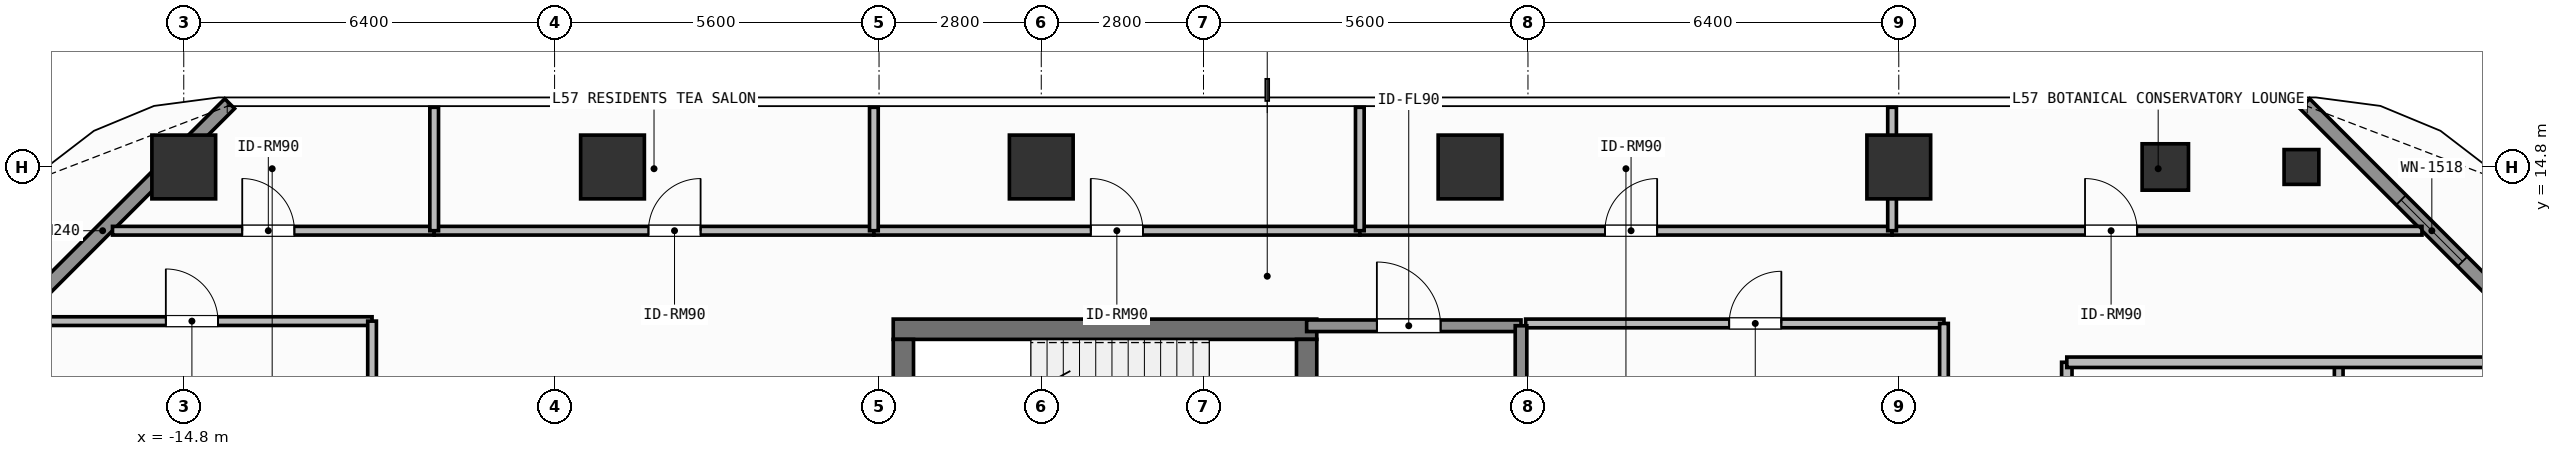
"""IFC4 building model, lengths in metres.
Left out: names, types, materials, properties, quantities, classifications, styles, units other than length and angle.
Written with IfcOpenShell. Run it as: python <this file> out.ifc"""

import sys

from ifc_helpers import new_model, si_unit, direction, frame, frame_2d, origin, origin_2d, place, context, subcontext, project, spatial, rectangle, hollow_rectangle, extrude, element, fill, save


model = new_model("IFC4")
c1 = context("Model", 3, precision=1e-05, world=origin(), true_north=direction((0.0, 1.0)))
c2 = subcontext(c1, "Body", "Model", "MODEL_VIEW")
j1 = project(units=[si_unit("LENGTHUNIT", "METRE"), si_unit("PLANEANGLEUNIT", "RADIAN")], contexts=[c1])
p1 = place(None, origin())
s1 = spatial("IfcSite", under=j1, at=p1, CompositionType="ELEMENT")
p2 = place(p1, origin())
s2 = spatial("IfcBuilding", under=s1, at=p2, CompositionType="ELEMENT")
p3 = place(p2, frame((0.0, 0.0, 231.3)))
s3 = spatial("IfcBuildingStorey", under=s2, at=p3, CompositionType="ELEMENT", Elevation=231.3)
p4 = place(p3, frame((-2.555, 12.0, 0.0), z_axis=(0.0, 0.0, 1.0), x_axis=(1.0, 0.0, 0.0)))
e1 = element("IfcWall", 1, at=p4, inside=s3, PredefinedType="SHEAR", context=c2, shape_type="SweptSolid", body=[
    extrude(rectangle(XDim=7.31, YDim=0.35, at=frame_2d((3.655, 0.0))), origin(), (0.0, 0.0, 1.0), 3.9),
])
p5 = place(p3, frame((-2.38, 8.9, 0.0), z_axis=(0.0, 0.0, 1.0), x_axis=(0.0, 1.0, 0.0)))
e2 = element("IfcWall", 2, at=p5, inside=s3, PredefinedType="SHEAR", context=c2, shape_type="SweptSolid", body=[
    extrude(rectangle(XDim=2.925, YDim=0.35, at=frame_2d((1.462, 0.0))), origin(), (0.0, 0.0, 1.0), 3.9),
])
p6 = place(p3, frame((4.58, 11.825, 0.0), z_axis=(0.0, 0.0, 1.0), x_axis=(0.0, -1.0, 0.0)))
e3 = element("IfcWall", 3, at=p6, inside=s3, PredefinedType="SHEAR", context=c2, shape_type="SweptSolid", body=[
    extrude(rectangle(XDim=2.925, YDim=0.35, at=frame_2d((1.462, 0.0))), origin(), (0.0, 0.0, 1.0), 3.9),
])
p7 = place(p6, frame((0.913, 0.0, 0.0)))
e4 = element("IfcOpeningElement", 4, at=p7, cuts=e3, PredefinedType="OPENING", context=c2, shape_type="SweptSolid", body=[
    extrude(rectangle(XDim=1.1, YDim=2.15, at=frame_2d((0.55, 1.075))), frame((0.0, 0.185, 0.0), z_axis=(0.0, -1.0, 0.0), x_axis=(1.0, 0.0, 0.0)), (0.0, 0.0, 1.0), 0.37),
])
for number, where, z_axis, x_axis in (
    (5, (-14.8, 14.8, 0.0), (0.0, 0.0, 1.0), (1.0, 0.0, 0.0)),
    (6, (-7.4, 14.8, 0.0), (0.0, 0.0, 1.0), (1.0, 0.0, 0.0)),
    (7, (0.0, 14.8, 0.0), (0.0, 0.0, 1.0), (1.0, 0.0, 0.0)),
    (8, (7.4, 14.8, 0.0), (0.0, 0.0, 1.0), (1.0, 0.0, 0.0)),
    (9, (14.8, 14.8, 0.0), (0.0, 0.0, 1.0), (1.0, 0.0, 0.0)),
):
    element("IfcColumn", number, at=place(p3, frame(where, z_axis=z_axis, x_axis=x_axis)), inside=s3, PredefinedType="COLUMN", context=c2, shape_type="SweptSolid", body=[
        extrude(rectangle(XDim=1.1, YDim=1.1, at=origin_2d()), origin(), (0.0, 0.0, 1.0), 3.9),
    ])
p8 = place(p3, frame((19.4, 14.8, 0.0), z_axis=(0.0, 0.0, 1.0), x_axis=(1.0, 0.0, 0.0)))
e10 = element("IfcColumn", 10, at=p8, inside=s3, PredefinedType="COLUMN", context=c2, shape_type="SweptSolid", body=[
    extrude(hollow_rectangle(XDim=0.8, YDim=0.8, WallThickness=0.036, at=origin_2d()), origin(), (0.0, 0.0, 1.0), 3.9),
])
p9 = place(p3, frame((21.75, 14.8, 0.0), z_axis=(0.0, 0.0, 1.0), x_axis=(1.0, 0.0, 0.0)))
e11 = element("IfcColumn", 11, at=p9, inside=s3, PredefinedType="COLUMN", context=c2, shape_type="SweptSolid", body=[
    extrude(hollow_rectangle(XDim=0.6, YDim=0.6, WallThickness=0.028, at=origin_2d()), origin(), (0.0, 0.0, 1.0), 3.9),
])
p10 = place(p3, frame((-18.392, 11.508, 0.0), z_axis=(0.0, 0.0, 1.0), x_axis=(0.707106781187, 0.707106781187, 0.0)))
e12 = element("IfcWall", 12, at=p10, inside=s3, PredefinedType="SOLIDWALL", context=c2, shape_type="SweptSolid", body=[
    extrude(rectangle(XDim=6.201, YDim=0.24, at=frame_2d((3.101, 0.0))), origin(), (0.0, 0.0, 1.0), 3.6),
])
p11 = place(p3, frame((21.808, 15.892, 0.0), z_axis=(0.0, 0.0, 1.0), x_axis=(0.707106781187, -0.707106781187, 0.0)))
e13 = element("IfcWall", 13, at=p11, inside=s3, PredefinedType="SOLIDWALL", context=c2, shape_type="SweptSolid", body=[
    extrude(rectangle(XDim=6.201, YDim=0.24, at=frame_2d((3.101, 0.0))), origin(), (0.0, 0.0, 1.0), 3.6),
])
p12 = place(p11, frame((2.351, 0.0, 0.8)))
e14 = element("IfcOpeningElement", 14, at=p12, cuts=e13, PredefinedType="OPENING", context=c2, shape_type="SweptSolid", body=[
    extrude(rectangle(XDim=1.5, YDim=1.85, at=frame_2d((0.75, 0.925))), frame((0.0, 0.13, 0.0), z_axis=(0.0, -1.0, 0.0), x_axis=(1.0, 0.0, 0.0)), (0.0, 0.0, 1.0), 0.26),
])
p13 = place(p3, frame((4.58, 12.06, 0.0), z_axis=(0.0, 0.0, 1.0), x_axis=(1.0, 0.0, 0.0)))
e15 = element("IfcWall", 15, at=p13, inside=s3, PredefinedType="SOLIDWALL", context=c2, shape_type="SweptSolid", body=[
    extrude(rectangle(XDim=3.7, YDim=0.2, at=frame_2d((1.85, 0.0))), origin(), (0.0, 0.0, 1.0), 3.6),
])
p14 = place(p13, frame((1.212, 0.0, 0.0)))
e16 = element("IfcOpeningElement", 16, at=p14, cuts=e15, PredefinedType="OPENING", context=c2, shape_type="SweptSolid", body=[
    extrude(rectangle(XDim=1.1, YDim=2.15, at=frame_2d((0.55, 1.075))), frame((0.0, 0.11, 0.0), z_axis=(0.0, -1.0, 0.0), x_axis=(1.0, 0.0, 0.0)), (0.0, 0.0, 1.0), 0.22),
])
p15 = place(p3, frame((8.36, 12.1, 0.0), z_axis=(0.0, 0.0, 1.0), x_axis=(1.0, 0.0, 0.0)))
e17 = element("IfcWall", 17, at=p15, inside=s3, PredefinedType="PARTITIONING", context=c2, shape_type="SweptSolid", body=[
    extrude(rectangle(XDim=7.22, YDim=0.15, at=frame_2d((3.61, 0.0))), origin(), (0.0, 0.0, 1.0), 3.6),
])
p16 = place(p15, frame((3.513, 0.0, 0.0)))
e18 = element("IfcOpeningElement", 18, at=p16, cuts=e17, PredefinedType="OPENING", context=c2, shape_type="SweptSolid", body=[
    extrude(rectangle(XDim=0.9, YDim=2.1, at=frame_2d((0.45, 1.05))), frame((0.0, 0.085, 0.0), z_axis=(0.0, -1.0, 0.0), x_axis=(1.0, 0.0, 0.0)), (0.0, 0.0, 1.0), 0.17),
])
p17 = place(p3, frame((-16.03, 13.7, 0.0), z_axis=(0.0, 0.0, 1.0), x_axis=(1.0, 0.0, 0.0)))
e19 = element("IfcWall", 19, at=p17, inside=s3, PredefinedType="PARTITIONING", context=c2, shape_type="SweptSolid", body=[
    extrude(rectangle(XDim=5.552, YDim=0.15, at=frame_2d((2.776, 0.0))), origin(), (0.0, 0.0, 1.0), 3.6),
])
p18 = place(p17, frame((2.24, 0.0, 0.0)))
e20 = element("IfcOpeningElement", 20, at=p18, cuts=e19, PredefinedType="OPENING", context=c2, shape_type="SweptSolid", body=[
    extrude(rectangle(XDim=0.9, YDim=2.1, at=frame_2d((0.45, 1.05))), frame((0.0, 0.085, 0.0), z_axis=(0.0, -1.0, 0.0), x_axis=(1.0, 0.0, 0.0)), (0.0, 0.0, 1.0), 0.17),
])
p19 = place(p3, frame((-10.478, 13.7, 0.0), z_axis=(0.0, 0.0, 1.0), x_axis=(1.0, 0.0, 0.0)))
e21 = element("IfcWall", 21, at=p19, inside=s3, PredefinedType="PARTITIONING", context=c2, shape_type="SweptSolid", body=[
    extrude(rectangle(XDim=7.589, YDim=0.15, at=frame_2d((3.794, 0.0))), origin(), (0.0, 0.0, 1.0), 3.6),
])
p20 = place(p19, frame((3.698, 0.0, 0.0)))
e22 = element("IfcOpeningElement", 22, at=p20, cuts=e21, PredefinedType="OPENING", context=c2, shape_type="SweptSolid", body=[
    extrude(rectangle(XDim=0.9, YDim=2.1, at=frame_2d((0.45, 1.05))), frame((0.0, 0.085, 0.0), z_axis=(0.0, -1.0, 0.0), x_axis=(1.0, 0.0, 0.0)), (0.0, 0.0, 1.0), 0.17),
])
p21 = place(p3, frame((-2.889, 13.7, 0.0), z_axis=(0.0, 0.0, 1.0), x_axis=(1.0, 0.0, 0.0)))
e23 = element("IfcWall", 23, at=p21, inside=s3, PredefinedType="PARTITIONING", context=c2, shape_type="SweptSolid", body=[
    extrude(rectangle(XDim=8.387, YDim=0.15, at=frame_2d((4.193, 0.0))), origin(), (0.0, 0.0, 1.0), 3.6),
])
p22 = place(p21, frame((3.743, 0.0, 0.0)))
e24 = element("IfcOpeningElement", 24, at=p22, cuts=e23, PredefinedType="OPENING", context=c2, shape_type="SweptSolid", body=[
    extrude(rectangle(XDim=0.9, YDim=2.1, at=frame_2d((0.45, 1.05))), frame((0.0, 0.085, 0.0), z_axis=(0.0, -1.0, 0.0), x_axis=(1.0, 0.0, 0.0)), (0.0, 0.0, 1.0), 0.17),
])
p23 = place(p3, frame((5.498, 13.7, 0.0), z_axis=(0.0, 0.0, 1.0), x_axis=(1.0, 0.0, 0.0)))
e25 = element("IfcWall", 25, at=p23, inside=s3, PredefinedType="PARTITIONING", context=c2, shape_type="SweptSolid", body=[
    extrude(rectangle(XDim=9.186, YDim=0.15, at=frame_2d((4.593, 0.0))), origin(), (0.0, 0.0, 1.0), 3.6),
])
p24 = place(p23, frame((4.231, 0.0, 0.0)))
e26 = element("IfcOpeningElement", 26, at=p24, cuts=e25, PredefinedType="OPENING", context=c2, shape_type="SweptSolid", body=[
    extrude(rectangle(XDim=0.9, YDim=2.1, at=frame_2d((0.45, 1.05))), frame((0.0, 0.085, 0.0), z_axis=(0.0, -1.0, 0.0), x_axis=(1.0, 0.0, 0.0)), (0.0, 0.0, 1.0), 0.17),
])
p25 = place(p3, frame((14.684, 13.7, 0.0), z_axis=(0.0, 0.0, 1.0), x_axis=(1.0, 0.0, 0.0)))
e27 = element("IfcWall", 27, at=p25, inside=s3, PredefinedType="PARTITIONING", context=c2, shape_type="SweptSolid", body=[
    extrude(rectangle(XDim=9.146, YDim=0.15, at=frame_2d((4.573, 0.0))), origin(), (0.0, 0.0, 1.0), 3.6),
])
p26 = place(p25, frame((3.33, 0.0, 0.0)))
e28 = element("IfcOpeningElement", 28, at=p26, cuts=e27, PredefinedType="OPENING", context=c2, shape_type="SweptSolid", body=[
    extrude(rectangle(XDim=0.9, YDim=2.1, at=frame_2d((0.45, 1.05))), frame((0.0, 0.085, 0.0), z_axis=(0.0, -1.0, 0.0), x_axis=(1.0, 0.0, 0.0)), (0.0, 0.0, 1.0), 0.17),
])
p27 = place(p3, frame((-17.59, 12.14, 0.0), z_axis=(0.0, 0.0, 1.0), x_axis=(1.0, 0.0, 0.0)))
e29 = element("IfcWall", 29, at=p27, inside=s3, PredefinedType="PARTITIONING", context=c2, shape_type="SweptSolid", body=[
    extrude(rectangle(XDim=6.04, YDim=0.15, at=frame_2d((3.02, 0.0))), origin(), (0.0, 0.0, 1.0), 3.6),
])
p28 = place(p27, frame((2.481, 0.0, 0.0)))
e30 = element("IfcOpeningElement", 30, at=p28, cuts=e29, PredefinedType="OPENING", context=c2, shape_type="SweptSolid", body=[
    extrude(rectangle(XDim=0.9, YDim=2.1, at=frame_2d((0.45, 1.05))), frame((0.0, 0.085, 0.0), z_axis=(0.0, -1.0, 0.0), x_axis=(1.0, 0.0, 0.0)), (0.0, 0.0, 1.0), 0.17),
])
p29 = place(p3, frame((17.7, -1.193, 0.0), z_axis=(0.0, 0.0, 1.0), x_axis=(0.0, 1.0, 0.0)))
e31 = element("IfcWall", 31, at=p29, inside=s3, PredefinedType="PARTITIONING", context=c2, shape_type="SweptSolid", body=[
    extrude(rectangle(XDim=12.623, YDim=0.18, at=frame_2d((6.312, 0.0))), origin(), (0.0, 0.0, 1.0), 3.6),
])
p30 = place(p29, frame((6.26, 0.0, 0.0)))
e32 = element("IfcOpeningElement", 32, at=p30, cuts=e31, PredefinedType="OPENING", context=c2, shape_type="SweptSolid", body=[
    extrude(rectangle(XDim=1.0, YDim=2.2, at=frame_2d((0.5, 1.1))), frame((0.0, 0.1, 0.0), z_axis=(0.0, -1.0, 0.0), x_axis=(1.0, 0.0, 0.0)), (0.0, 0.0, 1.0), 0.2),
])
p31 = place(p3, frame((8.28, 8.8, 0.0), z_axis=(0.0, 0.0, 1.0), x_axis=(0.0, 1.0, 0.0)))
e33 = element("IfcWall", 33, at=p31, inside=s3, PredefinedType="SOLIDWALL", context=c2, shape_type="SweptSolid", body=[
    extrude(rectangle(XDim=3.26, YDim=0.2, at=frame_2d((1.63, 0.0))), origin(), (0.0, 0.0, 1.0), 3.6),
])
p32 = place(p3, frame((15.58, 5.85, 0.0), z_axis=(0.0, 0.0, 1.0), x_axis=(0.0, 1.0, 0.0)))
e34 = element("IfcWall", 34, at=p32, inside=s3, PredefinedType="PARTITIONING", context=c2, shape_type="SweptSolid", body=[
    extrude(rectangle(XDim=6.25, YDim=0.15, at=frame_2d((3.125, 0.0))), origin(), (0.0, 0.0, 1.0), 3.6),
])
for number, where, z_axis, x_axis in (
    (35, (-10.478, 13.7, 0.0), (0.0, 0.0, 1.0), (0.0, 1.0, 0.0)),
    (36, (-2.889, 13.7, 0.0), (0.0, 0.0, 1.0), (0.0, 1.0, 0.0)),
    (37, (5.498, 13.7, 0.0), (0.0, 0.0, 1.0), (0.0, 1.0, 0.0)),
):
    element("IfcWall", number, at=place(p3, frame(where, z_axis=z_axis, x_axis=x_axis)), inside=s3, PredefinedType="PARTITIONING", context=c2, shape_type="SweptSolid", body=[
        extrude(rectangle(XDim=2.13, YDim=0.15, at=frame_2d((1.065, 0.0))), origin(), (0.0, 0.0, 1.0), 3.6),
    ])
p33 = place(p3, frame((14.684, 13.7, 0.0), z_axis=(0.0, 0.0, 1.0), x_axis=(0.0, 1.0, 0.0)))
e38 = element("IfcWall", 38, at=p33, inside=s3, PredefinedType="PARTITIONING", context=c2, shape_type="SweptSolid", body=[
    extrude(rectangle(XDim=2.13, YDim=0.15, at=frame_2d((1.065, 0.0))), origin(), (0.0, 0.0, 1.0), 3.102),
])
p34 = place(p3, frame((-11.55, 1.8, 0.0), z_axis=(0.0, 0.0, 1.0), x_axis=(0.0, 1.0, 0.0)))
e39 = element("IfcWall", 39, at=p34, inside=s3, PredefinedType="PARTITIONING", context=c2, shape_type="SweptSolid", body=[
    extrude(rectangle(XDim=10.34, YDim=0.15, at=frame_2d((5.17, 0.0))), origin(), (0.0, 0.0, 1.0), 3.6),
])
p35 = place(p3, frame((22.393, 8.461, 0.0), z_axis=(0.0, 0.0, 1.0), x_axis=(0.0, 1.0, 0.0)))
e40 = element("IfcWall", 40, at=p35, inside=s3, PredefinedType="PARTITIONING", context=c2, shape_type="SweptSolid", body=[
    extrude(rectangle(XDim=2.969, YDim=0.15, at=frame_2d((1.484, 0.0))), origin(), (0.0, 0.0, 1.0), 3.6),
])
p36 = place(p3, frame((17.7, 11.43, 0.0), z_axis=(0.0, 0.0, 1.0), x_axis=(1.0, 0.0, 0.0)))
e41 = element("IfcWall", 41, at=p36, inside=s3, PredefinedType="PARTITIONING", context=c2, shape_type="SweptSolid", body=[
    extrude(rectangle(XDim=8.43, YDim=0.18, at=frame_2d((4.215, 0.0))), origin(), (0.0, 0.0, 1.0), 3.34),
])
p37 = place(p12, origin())
e42 = element("IfcWindow", 42, at=p37, inside=s3, PartitioningType="SINGLE_PANEL", PredefinedType="WINDOW", context=c2, shape_type="SweptSolid", body=[
    extrude(rectangle(XDim=1.5, YDim=1.85, at=frame_2d((0.75, 0.925))), frame((0.0, 0.03, 0.0), z_axis=(0.0, -1.0, 0.0), x_axis=(1.0, 0.0, 0.0)), (0.0, 0.0, 1.0), 0.06),
])
fill(e14, e42)
p38 = place(p14, origin())
e43 = element("IfcDoor", 43, at=p38, inside=s3, OperationType="SINGLE_SWING_LEFT", PredefinedType="DOOR", context=c2, shape_type="SweptSolid", body=[
    extrude(rectangle(XDim=1.1, YDim=2.15, at=frame_2d((0.55, 1.075))), frame((0.0, 0.025, 0.0), z_axis=(0.0, -1.0, 0.0), x_axis=(1.0, 0.0, 0.0)), (0.0, 0.0, 1.0), 0.05),
])
fill(e16, e43)
p39 = place(p16, origin())
e44 = element("IfcDoor", 44, at=p39, inside=s3, OperationType="SINGLE_SWING_RIGHT", PredefinedType="DOOR", context=c2, shape_type="SweptSolid", body=[
    extrude(rectangle(XDim=0.9, YDim=2.1, at=frame_2d((0.45, 1.05))), frame((0.0, 0.025, 0.0), z_axis=(0.0, -1.0, 0.0), x_axis=(1.0, 0.0, 0.0)), (0.0, 0.0, 1.0), 0.05),
])
fill(e18, e44)
p40 = place(p18, origin())
e45 = element("IfcDoor", 45, at=p40, inside=s3, OperationType="SINGLE_SWING_LEFT", PredefinedType="DOOR", context=c2, shape_type="SweptSolid", body=[
    extrude(rectangle(XDim=0.9, YDim=2.1, at=frame_2d((0.45, 1.05))), frame((0.0, 0.025, 0.0), z_axis=(0.0, -1.0, 0.0), x_axis=(1.0, 0.0, 0.0)), (0.0, 0.0, 1.0), 0.05),
])
fill(e20, e45)
p41 = place(p20, origin())
e46 = element("IfcDoor", 46, at=p41, inside=s3, OperationType="SINGLE_SWING_RIGHT", PredefinedType="DOOR", context=c2, shape_type="SweptSolid", body=[
    extrude(rectangle(XDim=0.9, YDim=2.1, at=frame_2d((0.45, 1.05))), frame((0.0, 0.025, 0.0), z_axis=(0.0, -1.0, 0.0), x_axis=(1.0, 0.0, 0.0)), (0.0, 0.0, 1.0), 0.05),
])
fill(e22, e46)
p42 = place(p22, origin())
e47 = element("IfcDoor", 47, at=p42, inside=s3, OperationType="SINGLE_SWING_LEFT", PredefinedType="DOOR", context=c2, shape_type="SweptSolid", body=[
    extrude(rectangle(XDim=0.9, YDim=2.1, at=frame_2d((0.45, 1.05))), frame((0.0, 0.025, 0.0), z_axis=(0.0, -1.0, 0.0), x_axis=(1.0, 0.0, 0.0)), (0.0, 0.0, 1.0), 0.05),
])
fill(e24, e47)
p43 = place(p24, origin())
e48 = element("IfcDoor", 48, at=p43, inside=s3, OperationType="SINGLE_SWING_RIGHT", PredefinedType="DOOR", context=c2, shape_type="SweptSolid", body=[
    extrude(rectangle(XDim=0.9, YDim=2.1, at=frame_2d((0.45, 1.05))), frame((0.0, 0.025, 0.0), z_axis=(0.0, -1.0, 0.0), x_axis=(1.0, 0.0, 0.0)), (0.0, 0.0, 1.0), 0.05),
])
fill(e26, e48)
p44 = place(p26, origin())
e49 = element("IfcDoor", 49, at=p44, inside=s3, OperationType="SINGLE_SWING_LEFT", PredefinedType="DOOR", context=c2, shape_type="SweptSolid", body=[
    extrude(rectangle(XDim=0.9, YDim=2.1, at=frame_2d((0.45, 1.05))), frame((0.0, 0.025, 0.0), z_axis=(0.0, -1.0, 0.0), x_axis=(1.0, 0.0, 0.0)), (0.0, 0.0, 1.0), 0.05),
])
fill(e28, e49)
p45 = place(p28, origin())
e50 = element("IfcDoor", 50, at=p45, inside=s3, OperationType="SINGLE_SWING_LEFT", PredefinedType="DOOR", context=c2, shape_type="SweptSolid", body=[
    extrude(rectangle(XDim=0.9, YDim=2.1, at=frame_2d((0.45, 1.05))), frame((0.0, 0.025, 0.0), z_axis=(0.0, -1.0, 0.0), x_axis=(1.0, 0.0, 0.0)), (0.0, 0.0, 1.0), 0.05),
])
fill(e30, e50)
save(model, sys.argv[1])
